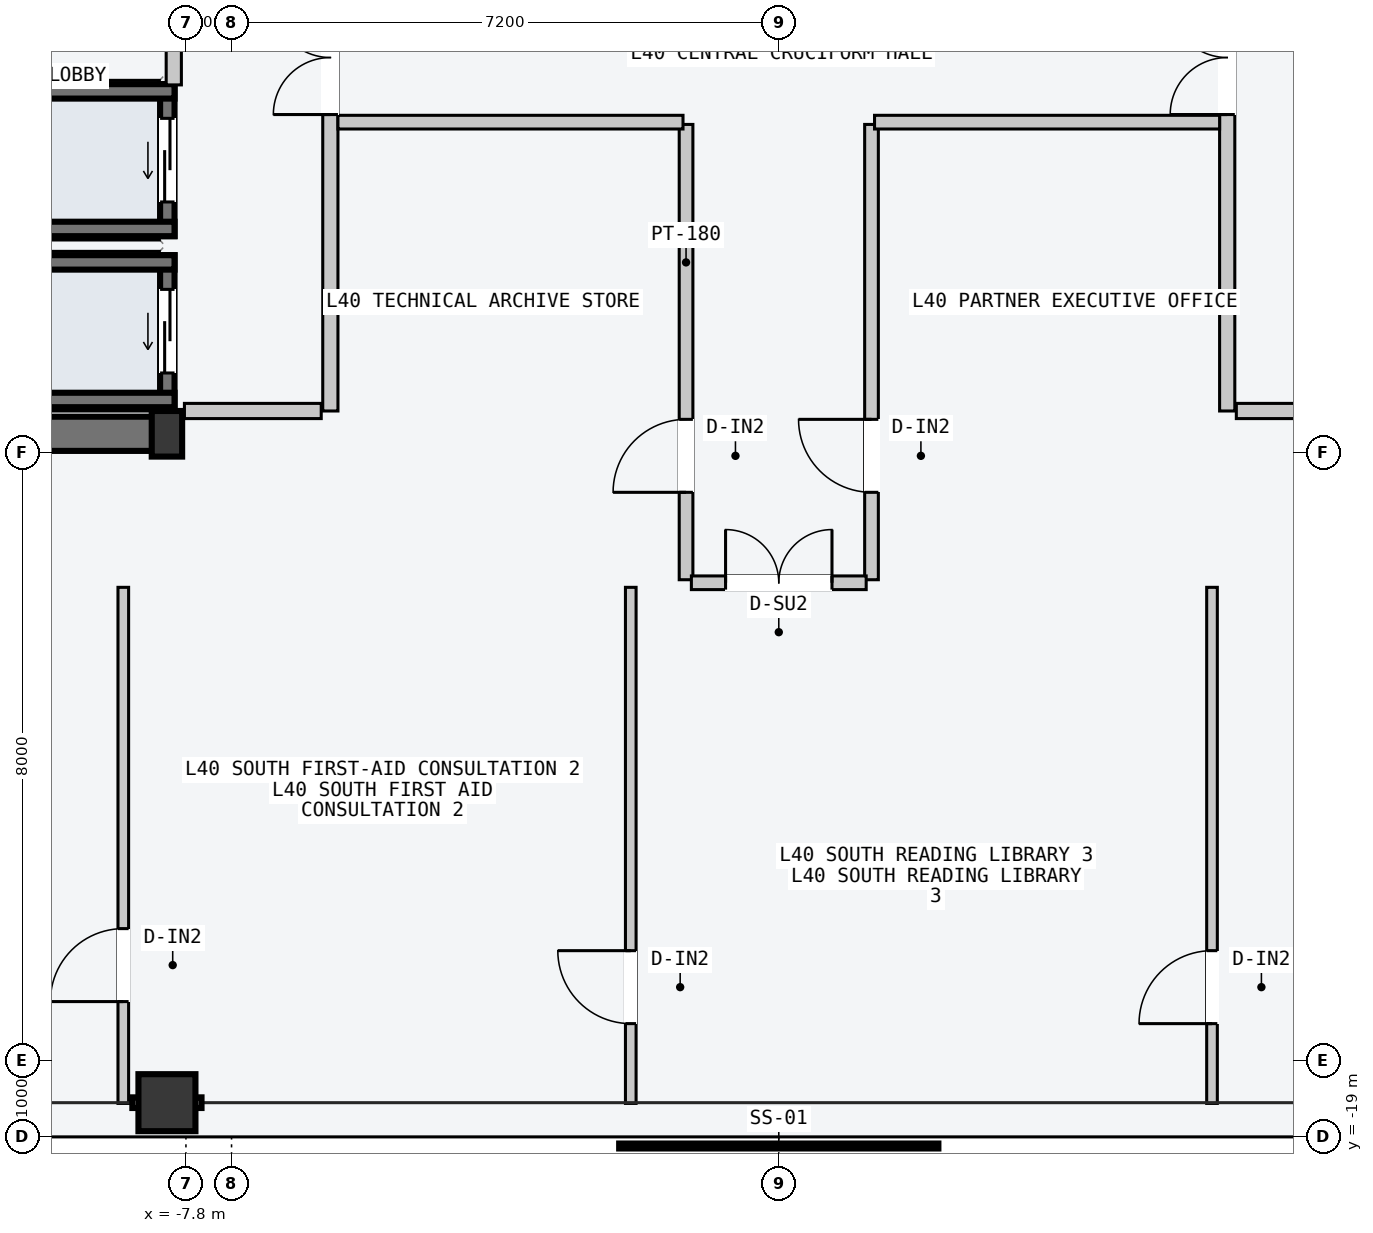
"""IFC4 building model, lengths in metres.
Left out: names, types, materials, properties, quantities, classifications, styles, units other than length and angle.
Written with IfcOpenShell. Run it as: python <this file> out.ifc"""

import sys

from ifc_helpers import new_model, si_unit, direction, frame, frame_2d, origin, origin_2d, place, context, subcontext, project, spatial, rectangle, hollow_rectangle, i_section, extrude, element, fill, save


model = new_model("IFC4")
c1 = context("Model", 3, precision=1e-05, world=origin(), true_north=direction((0.0, 1.0)))
c2 = subcontext(c1, "Body", "Model", "MODEL_VIEW")
j1 = project(units=[si_unit("LENGTHUNIT", "METRE"), si_unit("PLANEANGLEUNIT", "RADIAN")], contexts=[c1])
p1 = place(None, origin())
s1 = spatial("IfcSite", under=j1, at=p1, CompositionType="ELEMENT")
p2 = place(p1, origin())
s2 = spatial("IfcBuilding", under=s1, at=p2, CompositionType="ELEMENT")
p3 = place(p2, frame((0.0, 0.0, 155.1)))
s3 = spatial("IfcBuildingStorey", under=s2, at=p3, CompositionType="ELEMENT", Elevation=155.1)
p4 = place(p3, frame((-14.53, -9.75, -0.2), z_axis=(0.0, 0.0, 1.0), x_axis=(1.0, 0.0, 0.0)))
e1 = element("IfcWall", 1, at=p4, inside=s3, PredefinedType="SHEAR", context=c2, shape_type="SweptSolid", body=[
    extrude(rectangle(XDim=6.46, YDim=0.45, at=frame_2d((3.23, 0.0))), origin(), (0.0, 0.0, 1.0), 3.6),
])
p5 = place(p3, frame((-8.05, -9.75, 0.0), z_axis=(0.0, 0.0, 1.0), x_axis=(1.0, 0.0, 0.0)))
e2 = element("IfcColumn", 2, at=p5, inside=s3, PredefinedType="COLUMN", context=c2, shape_type="SweptSolid", body=[
    extrude(i_section(OverallWidth=0.4, OverallDepth=0.6, WebThickness=0.022, FlangeThickness=0.036, at=origin_2d()), origin(), (0.0, 0.0, 1.0), 3.6),
])
p6 = place(p3, frame((-8.05, -18.55, 0.0), z_axis=(0.0, 0.0, 1.0), x_axis=(1.0, 0.0, 0.0)))
e3 = element("IfcColumn", 3, at=p6, inside=s3, PredefinedType="COLUMN", context=c2, shape_type="SweptSolid", body=[
    extrude(hollow_rectangle(XDim=0.75, YDim=0.75, WallThickness=0.032, at=origin_2d()), origin(), (0.0, 0.0, 1.0), 3.6),
])
p7 = place(p3, frame((-8.045, -9.52, -0.2), z_axis=(0.0, 0.0, 1.0), x_axis=(0.0, 1.0, 0.0)))
e4 = element("IfcWall", 4, at=p7, inside=s3, PredefinedType="SOLIDWALL", context=c2, shape_type="SweptSolid", body=[
    extrude(rectangle(XDim=2.12, YDim=0.19, at=frame_2d((1.06, 0.0))), origin(), (0.0, 0.0, 1.0), 3.6),
])
p8 = place(p7, frame((0.57, 0.0, 0.2)))
e5 = element("IfcOpeningElement", 5, at=p8, cuts=e4, PredefinedType="OPENING", context=c2, shape_type="SweptSolid", body=[
    extrude(rectangle(XDim=1.1, YDim=2.2, at=frame_2d((0.55, 1.1))), frame((0.0, 0.105, 0.0), z_axis=(0.0, -1.0, 0.0), x_axis=(1.0, 0.0, 0.0)), (0.0, 0.0, 1.0), 0.21),
])
for number, where, z_axis, x_axis in (
    (6, (-10.15, -7.495, -0.2), (0.0, 0.0, 1.0), (1.0, 0.0, 0.0)),
    (7, (-10.15, -9.305, -0.2), (0.0, 0.0, 1.0), (1.0, 0.0, 0.0)),
):
    element("IfcWall", number, at=place(p3, frame(where, z_axis=z_axis, x_axis=x_axis)), inside=s3, PredefinedType="SOLIDWALL", context=c2, shape_type="SweptSolid", body=[
        extrude(rectangle(XDim=2.2, YDim=0.19, at=frame_2d((1.1, 0.0))), origin(), (0.0, 0.0, 1.0), 3.6),
    ])
p9 = place(p3, frame((-8.045, -7.15, -0.2), z_axis=(0.0, 0.0, 1.0), x_axis=(0.0, 1.0, 0.0)))
e8 = element("IfcWall", 8, at=p9, inside=s3, PredefinedType="SOLIDWALL", context=c2, shape_type="SweptSolid", body=[
    extrude(rectangle(XDim=2.0, YDim=0.19, at=frame_2d((1.0, 0.0))), origin(), (0.0, 0.0, 1.0), 3.6),
])
p10 = place(p9, frame((0.45, 0.0, 0.2)))
e9 = element("IfcOpeningElement", 9, at=p10, cuts=e8, PredefinedType="OPENING", context=c2, shape_type="SweptSolid", body=[
    extrude(rectangle(XDim=1.1, YDim=2.2, at=frame_2d((0.55, 1.1))), frame((0.0, 0.105, 0.0), z_axis=(0.0, -1.0, 0.0), x_axis=(1.0, 0.0, 0.0)), (0.0, 0.0, 1.0), 0.21),
])
for number, where, z_axis, x_axis in (
    (10, (-10.15, -5.245, -0.2), (0.0, 0.0, 1.0), (1.0, 0.0, 0.0)),
    (11, (-10.15, -7.055, -0.2), (0.0, 0.0, 1.0), (1.0, 0.0, 0.0)),
):
    element("IfcWall", number, at=place(p3, frame(where, z_axis=z_axis, x_axis=x_axis)), inside=s3, PredefinedType="SOLIDWALL", context=c2, shape_type="SweptSolid", body=[
        extrude(rectangle(XDim=2.2, YDim=0.19, at=frame_2d((1.1, 0.0))), origin(), (0.0, 0.0, 1.0), 3.6),
    ])
p11 = place(p3, frame((-5.9, -9.45, 0.0), z_axis=(0.0, 0.0, 1.0), x_axis=(0.0, 1.0, 0.0)))
e12 = element("IfcWall", 12, at=p11, inside=s3, PredefinedType="PARTITIONING", context=c2, shape_type="SweptSolid", body=[
    extrude(rectangle(XDim=10.5, YDim=0.2, at=frame_2d((5.25, 0.0))), origin(), (0.0, 0.0, 1.0), 3.4),
])
p12 = place(p11, frame((3.9, 0.0, 0.0)))
e13 = element("IfcOpeningElement", 13, at=p12, cuts=e12, PredefinedType="OPENING", context=c2, shape_type="SweptSolid", body=[
    extrude(rectangle(XDim=1.5, YDim=2.2, at=frame_2d((0.75, 1.1))), frame((0.0, 0.11, 0.0), z_axis=(0.0, -1.0, 0.0), x_axis=(1.0, 0.0, 0.0)), (0.0, 0.0, 1.0), 0.22),
])
p13 = place(p3, frame((-6.02, -9.45, 0.0), z_axis=(0.0, 0.0, 1.0), x_axis=(-1.0, 0.0, 0.0)))
e14 = element("IfcWall", 14, at=p13, inside=s3, PredefinedType="PARTITIONING", context=c2, shape_type="SweptSolid", body=[
    extrude(rectangle(XDim=1.8, YDim=0.2, at=frame_2d((0.9, 0.0))), origin(), (0.0, 0.0, 1.0), 3.4),
])
p14 = place(p3, frame((-7.96, -5.16, 0.0), z_axis=(0.0, 0.0, 1.0), x_axis=(0.0, 1.0, 0.0)))
e15 = element("IfcWall", 15, at=p14, inside=s3, PredefinedType="PARTITIONING", context=c2, shape_type="SweptSolid", body=[
    extrude(rectangle(XDim=2.44, YDim=0.2, at=frame_2d((1.22, 0.0))), origin(), (0.0, 0.0, 1.0), 3.4),
])
p15 = place(p3, frame((5.9, -9.45, 0.0), z_axis=(0.0, 0.0, 1.0), x_axis=(0.0, 1.0, 0.0)))
e16 = element("IfcWall", 16, at=p15, inside=s3, PredefinedType="PARTITIONING", context=c2, shape_type="SweptSolid", body=[
    extrude(rectangle(XDim=18.9, YDim=0.2, at=frame_2d((9.45, 0.0))), origin(), (0.0, 0.0, 1.0), 3.4),
])
p16 = place(p15, frame((3.9, 0.0, 0.0)))
e17 = element("IfcOpeningElement", 17, at=p16, cuts=e16, PredefinedType="OPENING", context=c2, shape_type="SweptSolid", body=[
    extrude(rectangle(XDim=1.5, YDim=2.2, at=frame_2d((0.75, 1.1))), frame((0.0, 0.11, 0.0), z_axis=(0.0, -1.0, 0.0), x_axis=(1.0, 0.0, 0.0)), (0.0, 0.0, 1.0), 0.22),
])
p17 = place(p3, frame((6.02, -9.45, 0.0), z_axis=(0.0, 0.0, 1.0), x_axis=(1.0, 0.0, 0.0)))
e18 = element("IfcWall", 18, at=p17, inside=s3, PredefinedType="PARTITIONING", context=c2, shape_type="SweptSolid", body=[
    extrude(rectangle(XDim=1.8, YDim=0.2, at=frame_2d((0.9, 0.0))), origin(), (0.0, 0.0, 1.0), 3.4),
])
p18 = place(p3, frame((-1.22, -11.67, 0.0), z_axis=(0.0, 0.0, 1.0), x_axis=(0.0, 1.0, 0.0)))
e19 = element("IfcWall", 19, at=p18, inside=s3, PredefinedType="PARTITIONING", context=c2, shape_type="SweptSolid", body=[
    extrude(rectangle(XDim=5.99, YDim=0.18, at=frame_2d((2.995, 0.0))), origin(), (0.0, 0.0, 1.0), 3.4),
])
p19 = place(p18, frame((1.15, 0.0, 0.0)))
e20 = element("IfcOpeningElement", 20, at=p19, cuts=e19, PredefinedType="OPENING", context=c2, shape_type="SweptSolid", body=[
    extrude(rectangle(XDim=0.96, YDim=2.18, at=frame_2d((0.48, 1.09))), frame((0.0, 0.1, 0.0), z_axis=(0.0, -1.0, 0.0), x_axis=(1.0, 0.0, 0.0)), (0.0, 0.0, 1.0), 0.2),
])
p20 = place(p3, frame((1.22, -11.67, 0.0), z_axis=(0.0, 0.0, 1.0), x_axis=(0.0, 1.0, 0.0)))
e21 = element("IfcWall", 21, at=p20, inside=s3, PredefinedType="PARTITIONING", context=c2, shape_type="SweptSolid", body=[
    extrude(rectangle(XDim=5.99, YDim=0.18, at=frame_2d((2.995, 0.0))), origin(), (0.0, 0.0, 1.0), 3.4),
])
p21 = place(p20, frame((1.15, 0.0, 0.0)))
e22 = element("IfcOpeningElement", 22, at=p21, cuts=e21, PredefinedType="OPENING", context=c2, shape_type="SweptSolid", body=[
    extrude(rectangle(XDim=0.96, YDim=2.18, at=frame_2d((0.48, 1.09))), frame((0.0, 0.1, 0.0), z_axis=(0.0, -1.0, 0.0), x_axis=(1.0, 0.0, 0.0)), (0.0, 0.0, 1.0), 0.2),
])
for number, where, z_axis, x_axis in (
    (23, (-5.8, -5.65, 0.0), (0.0, 0.0, 1.0), (1.0, 0.0, 0.0)),
    (24, (1.26, -5.65, 0.0), (0.0, 0.0, 1.0), (1.0, 0.0, 0.0)),
):
    element("IfcWall", number, at=place(p3, frame(where, z_axis=z_axis, x_axis=x_axis)), inside=s3, PredefinedType="PARTITIONING", context=c2, shape_type="SweptSolid", body=[
        extrude(rectangle(XDim=4.54, YDim=0.18, at=frame_2d((2.27, 0.0))), origin(), (0.0, 0.0, 1.0), 3.4),
    ])
p22 = place(p3, frame((-8.624, -18.56, 0.0), z_axis=(0.0, 0.0, 1.0), x_axis=(0.0, 1.0, 0.0)))
e25 = element("IfcWall", 25, at=p22, inside=s3, PredefinedType="PARTITIONING", context=c2, shape_type="SweptSolid", body=[
    extrude(rectangle(XDim=6.79, YDim=0.14, at=frame_2d((3.395, 0.0))), origin(), (0.0, 0.0, 1.0), 3.4),
])
p23 = place(p22, frame((1.34, 0.0, 0.0)))
e26 = element("IfcOpeningElement", 26, at=p23, cuts=e25, PredefinedType="OPENING", context=c2, shape_type="SweptSolid", body=[
    extrude(rectangle(XDim=0.96, YDim=2.18, at=frame_2d((0.48, 1.09))), frame((0.0, 0.08, 0.0), z_axis=(0.0, -1.0, 0.0), x_axis=(1.0, 0.0, 0.0)), (0.0, 0.0, 1.0), 0.16),
])
p24 = place(p3, frame((-1.948, -18.56, 0.0), z_axis=(0.0, 0.0, 1.0), x_axis=(0.0, 1.0, 0.0)))
e27 = element("IfcWall", 27, at=p24, inside=s3, PredefinedType="PARTITIONING", context=c2, shape_type="SweptSolid", body=[
    extrude(rectangle(XDim=6.79, YDim=0.14, at=frame_2d((3.395, 0.0))), origin(), (0.0, 0.0, 1.0), 3.4),
])
p25 = place(p24, frame((1.05, 0.0, 0.0)))
e28 = element("IfcOpeningElement", 28, at=p25, cuts=e27, PredefinedType="OPENING", context=c2, shape_type="SweptSolid", body=[
    extrude(rectangle(XDim=0.96, YDim=2.18, at=frame_2d((0.48, 1.09))), frame((0.0, 0.08, 0.0), z_axis=(0.0, -1.0, 0.0), x_axis=(1.0, 0.0, 0.0)), (0.0, 0.0, 1.0), 0.16),
])
p26 = place(p3, frame((5.7, -18.56, 0.0), z_axis=(0.0, 0.0, 1.0), x_axis=(0.0, 1.0, 0.0)))
e29 = element("IfcWall", 29, at=p26, inside=s3, PredefinedType="PARTITIONING", context=c2, shape_type="SweptSolid", body=[
    extrude(rectangle(XDim=6.79, YDim=0.14, at=frame_2d((3.395, 0.0))), origin(), (0.0, 0.0, 1.0), 3.4),
])
p27 = place(p26, frame((1.05, 0.0, 0.0)))
e30 = element("IfcOpeningElement", 30, at=p27, cuts=e29, PredefinedType="OPENING", context=c2, shape_type="SweptSolid", body=[
    extrude(rectangle(XDim=0.96, YDim=2.18, at=frame_2d((0.48, 1.09))), frame((0.0, 0.08, 0.0), z_axis=(0.0, -1.0, 0.0), x_axis=(1.0, 0.0, 0.0)), (0.0, 0.0, 1.0), 0.16),
])
p28 = place(p3, frame((-1.15, -11.71, 0.0), z_axis=(0.0, 0.0, 1.0), x_axis=(1.0, 0.0, 0.0)))
e31 = element("IfcWall", 31, at=p28, inside=s3, PredefinedType="PARTITIONING", context=c2, shape_type="SweptSolid", body=[
    extrude(rectangle(XDim=2.3, YDim=0.18, at=frame_2d((1.15, 0.0))), origin(), (0.0, 0.0, 1.0), 3.4),
])
p29 = place(p28, frame((0.45, 0.0, 0.0)))
e32 = element("IfcOpeningElement", 32, at=p29, cuts=e31, PredefinedType="OPENING", context=c2, shape_type="SweptSolid", body=[
    extrude(rectangle(XDim=1.4, YDim=2.2, at=frame_2d((0.7, 1.1))), frame((0.0, 0.1, 0.0), z_axis=(0.0, -1.0, 0.0), x_axis=(1.0, 0.0, 0.0)), (0.0, 0.0, 1.0), 0.2),
])
p30 = place(p8, origin())
e33 = element("IfcDoor", 33, at=p30, inside=s3, OperationType="SLIDING_TO_LEFT", PredefinedType="DOOR", context=c2, shape_type="SweptSolid", body=[
    extrude(rectangle(XDim=1.1, YDim=2.2, at=frame_2d((0.55, 1.1))), frame((0.0, 0.025, 0.0), z_axis=(0.0, -1.0, 0.0), x_axis=(1.0, 0.0, 0.0)), (0.0, 0.0, 1.0), 0.05),
])
fill(e5, e33)
p31 = place(p10, origin())
e34 = element("IfcDoor", 34, at=p31, inside=s3, OperationType="SLIDING_TO_LEFT", PredefinedType="DOOR", context=c2, shape_type="SweptSolid", body=[
    extrude(rectangle(XDim=1.1, YDim=2.2, at=frame_2d((0.55, 1.1))), frame((0.0, 0.025, 0.0), z_axis=(0.0, -1.0, 0.0), x_axis=(1.0, 0.0, 0.0)), (0.0, 0.0, 1.0), 0.05),
])
fill(e9, e34)
p32 = place(p12, origin())
e35 = element("IfcDoor", 35, at=p32, inside=s3, OperationType="DOUBLE_DOOR_SINGLE_SWING", PredefinedType="DOOR", context=c2, shape_type="SweptSolid", body=[
    extrude(rectangle(XDim=1.5, YDim=2.2, at=frame_2d((0.75, 1.1))), frame((0.0, 0.025, 0.0), z_axis=(0.0, -1.0, 0.0), x_axis=(1.0, 0.0, 0.0)), (0.0, 0.0, 1.0), 0.05),
])
fill(e13, e35)
p33 = place(p16, origin())
e36 = element("IfcDoor", 36, at=p33, inside=s3, OperationType="DOUBLE_DOOR_SINGLE_SWING", PredefinedType="DOOR", context=c2, shape_type="SweptSolid", body=[
    extrude(rectangle(XDim=1.5, YDim=2.2, at=frame_2d((0.75, 1.1))), frame((0.0, 0.025, 0.0), z_axis=(0.0, -1.0, 0.0), x_axis=(1.0, 0.0, 0.0)), (0.0, 0.0, 1.0), 0.05),
])
fill(e17, e36)
p34 = place(p19, origin())
e37 = element("IfcDoor", 37, at=p34, inside=s3, OperationType="SINGLE_SWING_LEFT", PredefinedType="DOOR", context=c2, shape_type="SweptSolid", body=[
    extrude(rectangle(XDim=0.96, YDim=2.18, at=frame_2d((0.48, 1.09))), frame((0.0, 0.025, 0.0), z_axis=(0.0, -1.0, 0.0), x_axis=(1.0, 0.0, 0.0)), (0.0, 0.0, 1.0), 0.05),
])
fill(e20, e37)
p35 = place(p21, origin())
e38 = element("IfcDoor", 38, at=p35, inside=s3, OperationType="SINGLE_SWING_RIGHT", PredefinedType="DOOR", context=c2, shape_type="SweptSolid", body=[
    extrude(rectangle(XDim=0.96, YDim=2.18, at=frame_2d((0.48, 1.09))), frame((0.0, 0.025, 0.0), z_axis=(0.0, -1.0, 0.0), x_axis=(1.0, 0.0, 0.0)), (0.0, 0.0, 1.0), 0.05),
])
fill(e22, e38)
p36 = place(p23, origin())
e39 = element("IfcDoor", 39, at=p36, inside=s3, OperationType="SINGLE_SWING_LEFT", PredefinedType="DOOR", context=c2, shape_type="SweptSolid", body=[
    extrude(rectangle(XDim=0.96, YDim=2.18, at=frame_2d((0.48, 1.09))), frame((0.0, 0.025, 0.0), z_axis=(0.0, -1.0, 0.0), x_axis=(1.0, 0.0, 0.0)), (0.0, 0.0, 1.0), 0.05),
])
fill(e26, e39)
p37 = place(p25, origin())
e40 = element("IfcDoor", 40, at=p37, inside=s3, OperationType="SINGLE_SWING_RIGHT", PredefinedType="DOOR", context=c2, shape_type="SweptSolid", body=[
    extrude(rectangle(XDim=0.96, YDim=2.18, at=frame_2d((0.48, 1.09))), frame((0.0, 0.025, 0.0), z_axis=(0.0, -1.0, 0.0), x_axis=(1.0, 0.0, 0.0)), (0.0, 0.0, 1.0), 0.05),
])
fill(e28, e40)
p38 = place(p27, origin())
e41 = element("IfcDoor", 41, at=p38, inside=s3, OperationType="SINGLE_SWING_LEFT", PredefinedType="DOOR", context=c2, shape_type="SweptSolid", body=[
    extrude(rectangle(XDim=0.96, YDim=2.18, at=frame_2d((0.48, 1.09))), frame((0.0, 0.025, 0.0), z_axis=(0.0, -1.0, 0.0), x_axis=(1.0, 0.0, 0.0)), (0.0, 0.0, 1.0), 0.05),
])
fill(e30, e41)
p39 = place(p29, origin())
e42 = element("IfcDoor", 42, at=p39, inside=s3, OperationType="DOUBLE_DOOR_SINGLE_SWING", PredefinedType="DOOR", context=c2, shape_type="SweptSolid", body=[
    extrude(rectangle(XDim=1.4, YDim=2.2, at=frame_2d((0.7, 1.1))), frame((0.0, 0.025, 0.0), z_axis=(0.0, -1.0, 0.0), x_axis=(1.0, 0.0, 0.0)), (0.0, 0.0, 1.0), 0.05),
])
fill(e32, e42)
save(model, sys.argv[1])
